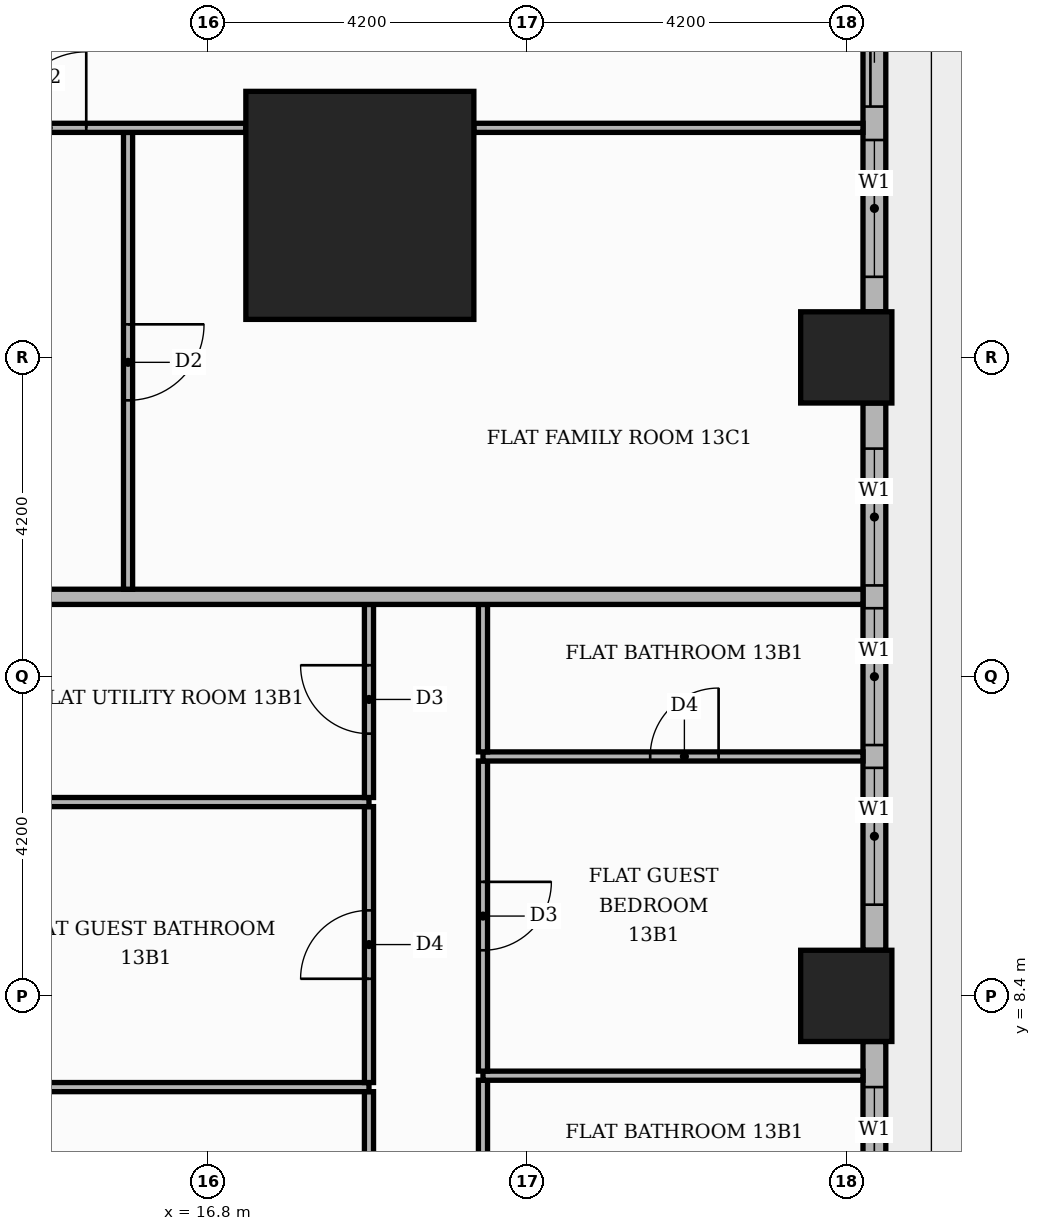
"""IFC4 building model, lengths in metres.
Left out: names, types, materials, properties, quantities, classifications, styles, units other than length and angle.
Written with IfcOpenShell. Run it as: python <this file> out.ifc"""

import sys

from ifc_helpers import new_model, si_unit, direction, frame, frame_2d, origin, origin_2d, place, context, subcontext, project, spatial, rectangle, extrude, element, fill, save


model = new_model("IFC4")
c1 = context("Model", 3, precision=1e-05, world=origin(), true_north=direction((0.0, 1.0)))
c2 = subcontext(c1, "Body", "Model", "MODEL_VIEW")
j1 = project(units=[si_unit("LENGTHUNIT", "METRE"), si_unit("PLANEANGLEUNIT", "RADIAN")], contexts=[c1])
p1 = place(None, origin())
s1 = spatial("IfcSite", under=j1, at=p1, CompositionType="ELEMENT")
p2 = place(p1, origin())
s2 = spatial("IfcBuilding", under=s1, at=p2, CompositionType="ELEMENT")
p3 = place(p2, frame((0.0, 0.0, 58.2)))
s3 = spatial("IfcBuildingStorey", under=s2, at=p3, CompositionType="ELEMENT", Elevation=58.2)
p4 = place(p3, frame((18.8, 18.8, 0.0), z_axis=(0.0, 0.0, 1.0), x_axis=(1.0, 0.0, 0.0)))
e1 = element("IfcColumn", 1, at=p4, inside=s3, PredefinedType="COLUMN", context=c2, shape_type="SweptSolid", body=[
    extrude(rectangle(XDim=3.0, YDim=3.0, at=origin_2d()), origin(), (0.0, 0.0, 1.0), 3.9),
])
for number, where, z_axis, x_axis in (
    (2, (25.2, 8.4, 0.0), (0.0, 0.0, 1.0), (1.0, 0.0, 0.0)),
    (3, (25.2, 16.8, 0.0), (0.0, 0.0, 1.0), (1.0, 0.0, 0.0)),
):
    element("IfcColumn", number, at=place(p3, frame(where, z_axis=z_axis, x_axis=x_axis)), inside=s3, PredefinedType="COLUMN", context=c2, shape_type="SweptSolid", body=[
        extrude(rectangle(XDim=1.2, YDim=1.2, at=origin_2d()), origin(), (0.0, 0.0, 1.0), 3.9),
    ])
p5 = place(p3, frame((25.57, 0.6, 0.0), z_axis=(0.0, 0.0, 1.0), x_axis=(0.0, 1.0, 0.0)))
e4 = element("IfcWall", 4, at=p5, inside=s3, PredefinedType="STANDARD", context=c2, shape_type="SweptSolid", body=[
    extrude(rectangle(XDim=7.2, YDim=0.3, at=frame_2d((3.6, 0.0))), origin(), (0.0, 0.0, 1.0), 3.48),
])
p6 = place(p5, frame((0.6, 0.0, 0.9)))
e5 = element("IfcOpeningElement", 5, at=p6, cuts=e4, PredefinedType="OPENING", context=c2, shape_type="SweptSolid", body=[
    extrude(rectangle(XDim=3.9, YDim=2.1, at=frame_2d((1.95, 1.05))), frame((0.0, 0.16, 0.0), z_axis=(0.0, -1.0, 0.0), x_axis=(1.0, 0.0, 0.0)), (0.0, 0.0, 1.0), 0.32),
])
p7 = place(p5, frame((4.8, 0.0, 0.9)))
e6 = element("IfcOpeningElement", 6, at=p7, cuts=e4, PredefinedType="OPENING", context=c2, shape_type="SweptSolid", body=[
    extrude(rectangle(XDim=1.8, YDim=2.1, at=frame_2d((0.9, 1.05))), frame((0.0, 0.16, 0.0), z_axis=(0.0, -1.0, 0.0), x_axis=(1.0, 0.0, 0.0)), (0.0, 0.0, 1.0), 0.32),
])
p8 = place(p3, frame((25.57, 9.0, 0.0), z_axis=(0.0, 0.0, 1.0), x_axis=(0.0, 1.0, 0.0)))
e7 = element("IfcWall", 7, at=p8, inside=s3, PredefinedType="STANDARD", context=c2, shape_type="SweptSolid", body=[
    extrude(rectangle(XDim=7.2, YDim=0.3, at=frame_2d((3.6, 0.0))), origin(), (0.0, 0.0, 1.0), 3.48),
])
p9 = place(p8, frame((0.6, 0.0, 0.9)))
e8 = element("IfcOpeningElement", 8, at=p9, cuts=e7, PredefinedType="OPENING", context=c2, shape_type="SweptSolid", body=[
    extrude(rectangle(XDim=1.8, YDim=2.1, at=frame_2d((0.9, 1.05))), frame((0.0, 0.16, 0.0), z_axis=(0.0, -1.0, 0.0), x_axis=(1.0, 0.0, 0.0)), (0.0, 0.0, 1.0), 0.32),
])
p10 = place(p8, frame((2.7, 0.0, 0.9)))
e9 = element("IfcOpeningElement", 9, at=p10, cuts=e7, PredefinedType="OPENING", context=c2, shape_type="SweptSolid", body=[
    extrude(rectangle(XDim=1.8, YDim=2.1, at=frame_2d((0.9, 1.05))), frame((0.0, 0.16, 0.0), z_axis=(0.0, -1.0, 0.0), x_axis=(1.0, 0.0, 0.0)), (0.0, 0.0, 1.0), 0.32),
])
p11 = place(p8, frame((4.8, 0.0, 0.9)))
e10 = element("IfcOpeningElement", 10, at=p11, cuts=e7, PredefinedType="OPENING", context=c2, shape_type="SweptSolid", body=[
    extrude(rectangle(XDim=1.8, YDim=2.1, at=frame_2d((0.9, 1.05))), frame((0.0, 0.16, 0.0), z_axis=(0.0, -1.0, 0.0), x_axis=(1.0, 0.0, 0.0)), (0.0, 0.0, 1.0), 0.32),
])
p12 = place(p3, frame((25.57, 17.4, 0.0), z_axis=(0.0, 0.0, 1.0), x_axis=(0.0, 1.0, 0.0)))
e11 = element("IfcWall", 11, at=p12, inside=s3, PredefinedType="STANDARD", context=c2, shape_type="SweptSolid", body=[
    extrude(rectangle(XDim=5.32, YDim=0.3, at=frame_2d((2.66, 0.0))), origin(), (0.0, 0.0, 1.0), 3.48),
])
p13 = place(p12, frame((2.7, 0.0, 0.0)))
e12 = element("IfcOpeningElement", 12, at=p13, cuts=e11, PredefinedType="OPENING", context=c2, shape_type="SweptSolid", body=[
    extrude(rectangle(XDim=1.8, YDim=2.4, at=frame_2d((0.9, 1.2))), frame((0.0, 0.16, 0.0), z_axis=(0.0, -1.0, 0.0), x_axis=(1.0, 0.0, 0.0)), (0.0, 0.0, 1.0), 0.32),
])
p14 = place(p12, frame((0.46, 0.0, 0.9)))
e13 = element("IfcOpeningElement", 13, at=p14, cuts=e11, PredefinedType="OPENING", context=c2, shape_type="SweptSolid", body=[
    extrude(rectangle(XDim=1.8, YDim=2.1, at=frame_2d((0.9, 1.05))), frame((0.0, 0.16, 0.0), z_axis=(0.0, -1.0, 0.0), x_axis=(1.0, 0.0, 0.0)), (0.0, 0.0, 1.0), 0.32),
])
p15 = place(p3, frame((18.92, 1.56, 0.0), z_axis=(0.0, 0.0, 1.0), x_axis=(0.0, 1.0, 0.0)))
e14 = element("IfcWall", 14, at=p15, inside=s3, PredefinedType="PARTITIONING", context=c2, shape_type="SweptSolid", body=[
    extrude(rectangle(XDim=5.58, YDim=0.12, at=frame_2d((2.79, 0.0))), origin(), (0.0, 0.0, 1.0), 3.48),
])
p16 = place(p15, frame((2.34, 0.0, 0.0)))
e15 = element("IfcOpeningElement", 15, at=p16, cuts=e14, PredefinedType="OPENING", context=c2, shape_type="SweptSolid", body=[
    extrude(rectangle(XDim=0.9, YDim=2.1, at=frame_2d((0.45, 1.05))), frame((0.0, 0.07, 0.0), z_axis=(0.0, -1.0, 0.0), x_axis=(1.0, 0.0, 0.0)), (0.0, 0.0, 1.0), 0.14),
])
p17 = place(p3, frame((20.42, 5.31, 0.0), z_axis=(0.0, 0.0, 1.0), x_axis=(0.0, 1.0, 0.0)))
e16 = element("IfcWall", 16, at=p17, inside=s3, PredefinedType="PARTITIONING", context=c2, shape_type="SweptSolid", body=[
    extrude(rectangle(XDim=1.98, YDim=0.12, at=frame_2d((0.99, 0.0))), origin(), (0.0, 0.0, 1.0), 3.48),
])
p18 = place(p3, frame((13.75, 7.2, 0.0), z_axis=(0.0, 0.0, 1.0), x_axis=(1.0, 0.0, 0.0)))
e17 = element("IfcWall", 17, at=p18, inside=s3, PredefinedType="PARTITIONING", context=c2, shape_type="SweptSolid", body=[
    extrude(rectangle(XDim=5.17, YDim=0.12, at=frame_2d((2.585, 0.0))), origin(), (0.0, 0.0, 1.0), 3.48),
])
p19 = place(p3, frame((18.92, 7.26, 0.0), z_axis=(0.0, 0.0, 1.0), x_axis=(0.0, 1.0, 0.0)))
e18 = element("IfcWall", 18, at=p19, inside=s3, PredefinedType="PARTITIONING", context=c2, shape_type="SweptSolid", body=[
    extrude(rectangle(XDim=3.63, YDim=0.12, at=frame_2d((1.815, 0.0))), origin(), (0.0, 0.0, 1.0), 3.48),
])
p20 = place(p19, frame((1.365, 0.0, 0.0)))
e19 = element("IfcOpeningElement", 19, at=p20, cuts=e18, PredefinedType="OPENING", context=c2, shape_type="SweptSolid", body=[
    extrude(rectangle(XDim=0.9, YDim=2.1, at=frame_2d((0.45, 1.05))), frame((0.0, 0.07, 0.0), z_axis=(0.0, -1.0, 0.0), x_axis=(1.0, 0.0, 0.0)), (0.0, 0.0, 1.0), 0.14),
])
p21 = place(p3, frame((20.42, 7.35, 0.0), z_axis=(0.0, 0.0, 1.0), x_axis=(1.0, 0.0, 0.0)))
e20 = element("IfcWall", 20, at=p21, inside=s3, PredefinedType="PARTITIONING", context=c2, shape_type="SweptSolid", body=[
    extrude(rectangle(XDim=5.0, YDim=0.12, at=frame_2d((2.5, 0.0))), origin(), (0.0, 0.0, 1.0), 3.48),
])
p22 = place(p3, frame((20.42, 7.41, 0.0), z_axis=(0.0, 0.0, 1.0), x_axis=(0.0, 1.0, 0.0)))
e21 = element("IfcWall", 21, at=p22, inside=s3, PredefinedType="PARTITIONING", context=c2, shape_type="SweptSolid", body=[
    extrude(rectangle(XDim=4.08, YDim=0.12, at=frame_2d((2.04, 0.0))), origin(), (0.0, 0.0, 1.0), 3.48),
])
p23 = place(p22, frame((1.59, 0.0, 0.0)))
e22 = element("IfcOpeningElement", 22, at=p23, cuts=e21, PredefinedType="OPENING", context=c2, shape_type="SweptSolid", body=[
    extrude(rectangle(XDim=0.9, YDim=2.1, at=frame_2d((0.45, 1.05))), frame((0.0, 0.07, 0.0), z_axis=(0.0, -1.0, 0.0), x_axis=(1.0, 0.0, 0.0)), (0.0, 0.0, 1.0), 0.14),
])
p24 = place(p3, frame((13.75, 10.95, 0.0), z_axis=(0.0, 0.0, 1.0), x_axis=(1.0, 0.0, 0.0)))
e23 = element("IfcWall", 23, at=p24, inside=s3, PredefinedType="PARTITIONING", context=c2, shape_type="SweptSolid", body=[
    extrude(rectangle(XDim=5.17, YDim=0.12, at=frame_2d((2.585, 0.0))), origin(), (0.0, 0.0, 1.0), 3.48),
])
p25 = place(p3, frame((18.92, 11.01, 0.0), z_axis=(0.0, 0.0, 1.0), x_axis=(0.0, 1.0, 0.0)))
e24 = element("IfcWall", 24, at=p25, inside=s3, PredefinedType="PARTITIONING", context=c2, shape_type="SweptSolid", body=[
    extrude(rectangle(XDim=2.54, YDim=0.12, at=frame_2d((1.27, 0.0))), origin(), (0.0, 0.0, 1.0), 3.48),
])
p26 = place(p25, frame((0.84, 0.0, 0.0)))
e25 = element("IfcOpeningElement", 25, at=p26, cuts=e24, PredefinedType="OPENING", context=c2, shape_type="SweptSolid", body=[
    extrude(rectangle(XDim=0.9, YDim=2.1, at=frame_2d((0.45, 1.05))), frame((0.0, 0.07, 0.0), z_axis=(0.0, -1.0, 0.0), x_axis=(1.0, 0.0, 0.0)), (0.0, 0.0, 1.0), 0.14),
])
p27 = place(p3, frame((20.42, 11.55, 0.0), z_axis=(0.0, 0.0, 1.0), x_axis=(1.0, 0.0, 0.0)))
e26 = element("IfcWall", 26, at=p27, inside=s3, PredefinedType="PARTITIONING", context=c2, shape_type="SweptSolid", body=[
    extrude(rectangle(XDim=5.0, YDim=0.12, at=frame_2d((2.5, 0.0))), origin(), (0.0, 0.0, 1.0), 3.48),
])
p28 = place(p27, frame((2.2, 0.0, 0.0)))
e27 = element("IfcOpeningElement", 27, at=p28, cuts=e26, PredefinedType="OPENING", context=c2, shape_type="SweptSolid", body=[
    extrude(rectangle(XDim=0.9, YDim=2.1, at=frame_2d((0.45, 1.05))), frame((0.0, 0.07, 0.0), z_axis=(0.0, -1.0, 0.0), x_axis=(1.0, 0.0, 0.0)), (0.0, 0.0, 1.0), 0.14),
])
p29 = place(p3, frame((20.42, 11.61, 0.0), z_axis=(0.0, 0.0, 1.0), x_axis=(0.0, 1.0, 0.0)))
e28 = element("IfcWall", 28, at=p29, inside=s3, PredefinedType="PARTITIONING", context=c2, shape_type="SweptSolid", body=[
    extrude(rectangle(XDim=1.94, YDim=0.12, at=frame_2d((0.97, 0.0))), origin(), (0.0, 0.0, 1.0), 3.48),
])
p30 = place(p3, frame((-13.65, 13.65, 0.0), z_axis=(0.0, 0.0, 1.0), x_axis=(1.0, 0.0, 0.0)))
e29 = element("IfcWall", 29, at=p30, inside=s3, PredefinedType="PARTITIONING", context=c2, shape_type="SweptSolid", body=[
    extrude(rectangle(XDim=39.07, YDim=0.2, at=frame_2d((19.535, 0.0))), origin(), (0.0, 0.0, 1.0), 3.48),
])
p31 = place(p30, frame((24.65, 0.0, 0.0)))
e30 = element("IfcOpeningElement", 30, at=p31, cuts=e29, PredefinedType="OPENING", context=c2, shape_type="SweptSolid", body=[
    extrude(rectangle(XDim=1.1, YDim=2.4, at=frame_2d((0.55, 1.2))), frame((0.0, 0.11, 0.0), z_axis=(0.0, -1.0, 0.0), x_axis=(1.0, 0.0, 0.0)), (0.0, 0.0, 1.0), 0.22),
])
p32 = place(p30, frame((14.15, 0.0, 0.0)))
e31 = element("IfcOpeningElement", 31, at=p32, cuts=e29, PredefinedType="OPENING", context=c2, shape_type="SweptSolid", body=[
    extrude(rectangle(XDim=1.1, YDim=2.4, at=frame_2d((0.55, 1.2))), frame((0.0, 0.11, 0.0), z_axis=(0.0, -1.0, 0.0), x_axis=(1.0, 0.0, 0.0)), (0.0, 0.0, 1.0), 0.22),
])
p33 = place(p3, frame((15.75, 13.75, 0.0), z_axis=(0.0, 0.0, 1.0), x_axis=(0.0, 1.0, 0.0)))
e32 = element("IfcWall", 32, at=p33, inside=s3, PredefinedType="PARTITIONING", context=c2, shape_type="SweptSolid", body=[
    extrude(rectangle(XDim=6.01, YDim=0.12, at=frame_2d((3.005, 0.0))), origin(), (0.0, 0.0, 1.0), 3.48),
])
p34 = place(p33, frame((2.485, 0.0, 0.0)))
e33 = element("IfcOpeningElement", 33, at=p34, cuts=e32, PredefinedType="OPENING", context=c2, shape_type="SweptSolid", body=[
    extrude(rectangle(XDim=1.0, YDim=2.1, at=frame_2d((0.5, 1.05))), frame((0.0, 0.07, 0.0), z_axis=(0.0, -1.0, 0.0), x_axis=(1.0, 0.0, 0.0)), (0.0, 0.0, 1.0), 0.14),
])
p35 = place(p3, frame((5.35, 19.82, 0.0), z_axis=(0.0, 0.0, 1.0), x_axis=(1.0, 0.0, 0.0)))
e34 = element("IfcWall", 34, at=p35, inside=s3, PredefinedType="PARTITIONING", context=c2, shape_type="SweptSolid", body=[
    extrude(rectangle(XDim=11.95, YDim=0.12, at=frame_2d((5.975, 0.0))), origin(), (0.0, 0.0, 1.0), 3.48),
])
p36 = place(p35, frame((8.85, 0.0, 0.0)))
e35 = element("IfcOpeningElement", 35, at=p36, cuts=e34, PredefinedType="OPENING", context=c2, shape_type="SweptSolid", body=[
    extrude(rectangle(XDim=1.0, YDim=2.1, at=frame_2d((0.5, 1.05))), frame((0.0, 0.07, 0.0), z_axis=(0.0, -1.0, 0.0), x_axis=(1.0, 0.0, 0.0)), (0.0, 0.0, 1.0), 0.14),
])
p37 = place(p35, frame((5.75, 0.0, 0.0)))
e36 = element("IfcOpeningElement", 36, at=p37, cuts=e34, PredefinedType="OPENING", context=c2, shape_type="SweptSolid", body=[
    extrude(rectangle(XDim=0.9, YDim=2.1, at=frame_2d((0.45, 1.05))), frame((0.0, 0.07, 0.0), z_axis=(0.0, -1.0, 0.0), x_axis=(1.0, 0.0, 0.0)), (0.0, 0.0, 1.0), 0.14),
])
p38 = place(p3, frame((20.3, 19.82, 0.0), z_axis=(0.0, 0.0, 1.0), x_axis=(1.0, 0.0, 0.0)))
e37 = element("IfcWall", 37, at=p38, inside=s3, PredefinedType="PARTITIONING", context=c2, shape_type="SweptSolid", body=[
    extrude(rectangle(XDim=5.12, YDim=0.12, at=frame_2d((2.56, 0.0))), origin(), (0.0, 0.0, 1.0), 3.48),
])
p39 = place(p7, origin())
e38 = element("IfcWindow", 38, at=p39, inside=s3, PartitioningType="SINGLE_PANEL", PredefinedType="WINDOW", context=c2, shape_type="SweptSolid", body=[
    extrude(rectangle(XDim=1.8, YDim=2.1, at=frame_2d((0.9, 1.05))), frame((0.0, 0.03, 0.0), z_axis=(0.0, -1.0, 0.0), x_axis=(1.0, 0.0, 0.0)), (0.0, 0.0, 1.0), 0.06),
])
fill(e6, e38)
p40 = place(p9, origin())
e39 = element("IfcWindow", 39, at=p40, inside=s3, PartitioningType="SINGLE_PANEL", PredefinedType="WINDOW", context=c2, shape_type="SweptSolid", body=[
    extrude(rectangle(XDim=1.8, YDim=2.1, at=frame_2d((0.9, 1.05))), frame((0.0, 0.03, 0.0), z_axis=(0.0, -1.0, 0.0), x_axis=(1.0, 0.0, 0.0)), (0.0, 0.0, 1.0), 0.06),
])
fill(e8, e39)
p41 = place(p10, origin())
e40 = element("IfcWindow", 40, at=p41, inside=s3, PartitioningType="SINGLE_PANEL", PredefinedType="WINDOW", context=c2, shape_type="SweptSolid", body=[
    extrude(rectangle(XDim=1.8, YDim=2.1, at=frame_2d((0.9, 1.05))), frame((0.0, 0.03, 0.0), z_axis=(0.0, -1.0, 0.0), x_axis=(1.0, 0.0, 0.0)), (0.0, 0.0, 1.0), 0.06),
])
fill(e9, e40)
p42 = place(p11, origin())
e41 = element("IfcWindow", 41, at=p42, inside=s3, PartitioningType="SINGLE_PANEL", PredefinedType="WINDOW", context=c2, shape_type="SweptSolid", body=[
    extrude(rectangle(XDim=1.8, YDim=2.1, at=frame_2d((0.9, 1.05))), frame((0.0, 0.03, 0.0), z_axis=(0.0, -1.0, 0.0), x_axis=(1.0, 0.0, 0.0)), (0.0, 0.0, 1.0), 0.06),
])
fill(e10, e41)
p43 = place(p13, origin())
e42 = element("IfcDoor", 42, at=p43, inside=s3, OperationType="SLIDING_TO_LEFT", PredefinedType="DOOR", context=c2, shape_type="SweptSolid", body=[
    extrude(rectangle(XDim=1.8, YDim=2.4, at=frame_2d((0.9, 1.2))), frame((0.0, 0.025, 0.0), z_axis=(0.0, -1.0, 0.0), x_axis=(1.0, 0.0, 0.0)), (0.0, 0.0, 1.0), 0.05),
])
fill(e12, e42)
p44 = place(p14, origin())
e43 = element("IfcWindow", 43, at=p44, inside=s3, PartitioningType="SINGLE_PANEL", PredefinedType="WINDOW", context=c2, shape_type="SweptSolid", body=[
    extrude(rectangle(XDim=1.8, YDim=2.1, at=frame_2d((0.9, 1.05))), frame((0.0, 0.03, 0.0), z_axis=(0.0, -1.0, 0.0), x_axis=(1.0, 0.0, 0.0)), (0.0, 0.0, 1.0), 0.06),
])
fill(e13, e43)
p45 = place(p20, origin())
e44 = element("IfcDoor", 44, at=p45, inside=s3, OperationType="SINGLE_SWING_LEFT", PredefinedType="DOOR", context=c2, shape_type="SweptSolid", body=[
    extrude(rectangle(XDim=0.9, YDim=2.1, at=frame_2d((0.45, 1.05))), frame((0.0, 0.025, 0.0), z_axis=(0.0, -1.0, 0.0), x_axis=(1.0, 0.0, 0.0)), (0.0, 0.0, 1.0), 0.05),
])
fill(e19, e44)
p46 = place(p26, origin())
e45 = element("IfcDoor", 45, at=p46, inside=s3, OperationType="SINGLE_SWING_RIGHT", PredefinedType="DOOR", context=c2, shape_type="SweptSolid", body=[
    extrude(rectangle(XDim=0.9, YDim=2.1, at=frame_2d((0.45, 1.05))), frame((0.0, 0.025, 0.0), z_axis=(0.0, -1.0, 0.0), x_axis=(1.0, 0.0, 0.0)), (0.0, 0.0, 1.0), 0.05),
])
fill(e25, e45)
p47 = place(p23, frame((0.9, 0.0, 0.0), z_axis=(0.0, 0.0, 1.0), x_axis=(-1.0, 0.0, 0.0)))
e46 = element("IfcDoor", 46, at=p47, inside=s3, OperationType="SINGLE_SWING_RIGHT", PredefinedType="DOOR", context=c2, shape_type="SweptSolid", body=[
    extrude(rectangle(XDim=0.9, YDim=2.1, at=frame_2d((0.45, 1.05))), frame((0.0, 0.025, 0.0), z_axis=(0.0, -1.0, 0.0), x_axis=(1.0, 0.0, 0.0)), (0.0, 0.0, 1.0), 0.05),
])
fill(e22, e46)
p48 = place(p28, origin())
e47 = element("IfcDoor", 47, at=p48, inside=s3, OperationType="SINGLE_SWING_RIGHT", PredefinedType="DOOR", context=c2, shape_type="SweptSolid", body=[
    extrude(rectangle(XDim=0.9, YDim=2.1, at=frame_2d((0.45, 1.05))), frame((0.0, 0.025, 0.0), z_axis=(0.0, -1.0, 0.0), x_axis=(1.0, 0.0, 0.0)), (0.0, 0.0, 1.0), 0.05),
])
fill(e27, e47)
p49 = place(p34, frame((1.0, 0.0, 0.0), z_axis=(0.0, 0.0, 1.0), x_axis=(-1.0, 0.0, 0.0)))
e48 = element("IfcDoor", 48, at=p49, inside=s3, OperationType="SINGLE_SWING_RIGHT", PredefinedType="DOOR", context=c2, shape_type="SweptSolid", body=[
    extrude(rectangle(XDim=1.0, YDim=2.1, at=frame_2d((0.5, 1.05))), frame((0.0, 0.025, 0.0), z_axis=(0.0, -1.0, 0.0), x_axis=(1.0, 0.0, 0.0)), (0.0, 0.0, 1.0), 0.05),
])
fill(e33, e48)
p50 = place(p36, origin())
e49 = element("IfcDoor", 49, at=p50, inside=s3, OperationType="SINGLE_SWING_RIGHT", PredefinedType="DOOR", context=c2, shape_type="SweptSolid", body=[
    extrude(rectangle(XDim=1.0, YDim=2.1, at=frame_2d((0.5, 1.05))), frame((0.0, 0.025, 0.0), z_axis=(0.0, -1.0, 0.0), x_axis=(1.0, 0.0, 0.0)), (0.0, 0.0, 1.0), 0.05),
])
fill(e35, e49)
save(model, sys.argv[1])
